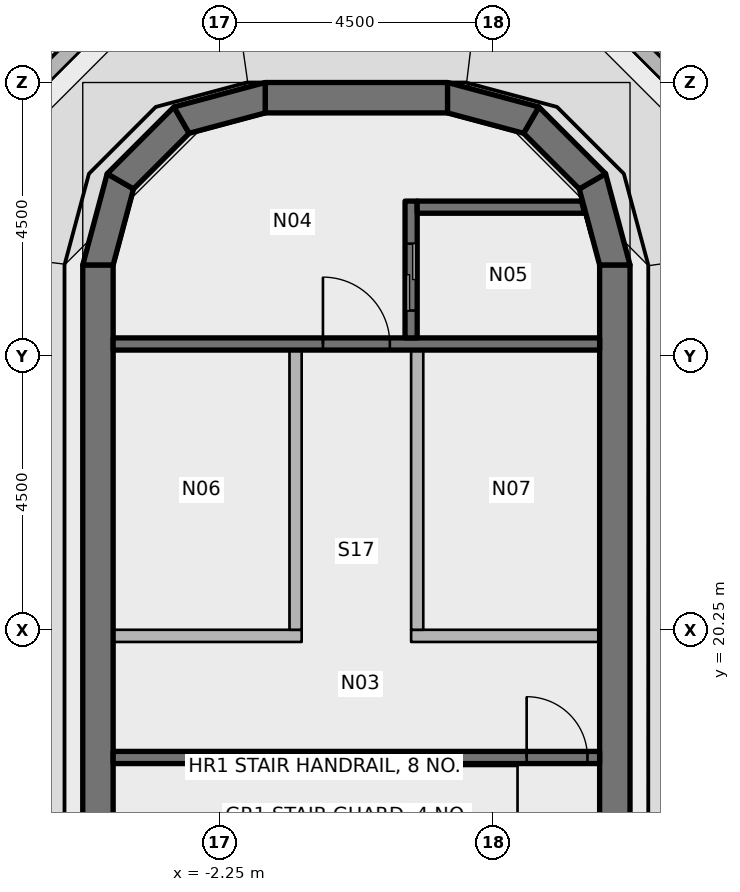
"""IFC4 building model, lengths in metres.
Left out: names, types, materials, properties, quantities, classifications, styles, units other than length and angle.
Written with IfcOpenShell. Run it as: python <this file> out.ifc"""

import sys

from ifc_helpers import new_model, si_unit, direction, frame, frame_2d, origin, place, context, subcontext, project, spatial, polyline, rectangle, outline, extrude, element, fill, save


model = new_model("IFC4")
c1 = context("Model", 3, precision=1e-05, world=origin(), true_north=direction((0.0, 1.0)))
c2 = subcontext(c1, "Body", "Model", "MODEL_VIEW")
j1 = project(units=[si_unit("LENGTHUNIT", "METRE"), si_unit("PLANEANGLEUNIT", "RADIAN")], contexts=[c1])
p1 = place(None, origin())
s1 = spatial("IfcSite", under=j1, at=p1, CompositionType="ELEMENT")
p2 = place(p1, origin())
s2 = spatial("IfcBuilding", under=s1, at=p2, CompositionType="ELEMENT")
p3 = place(p2, frame((0.0, 0.0, 316.8)))
s3 = spatial("IfcBuildingStorey", under=s2, at=p3, CompositionType="ELEMENT", Elevation=316.8)
for number, where, z_axis, x_axis in (
    (1, (-4.25, 11.25, 0.0), (0.0, 0.0, 1.0), (0.0, 1.0, 0.0)),
    (2, (4.25, 11.25, 0.0), (0.0, 0.0, 1.0), (0.0, 1.0, 0.0)),
):
    element("IfcWall", number, at=place(p3, frame(where, z_axis=z_axis, x_axis=x_axis)), inside=s3, PredefinedType="SHEAR", context=c2, shape_type="SweptSolid", body=[
        extrude(rectangle(XDim=15.0, YDim=0.5, at=frame_2d((7.5, 0.0))), origin(), (0.0, 0.0, 1.0), 3.35),
    ])
p4 = place(p3, frame((-1.5, 29.0, 0.0), z_axis=(0.0, 0.0, 1.0), x_axis=(1.0, 0.0, 0.0)))
e3 = element("IfcWall", 3, at=p4, inside=s3, PredefinedType="SHEAR", context=c2, shape_type="SweptSolid", body=[
    extrude(rectangle(XDim=3.0, YDim=0.5, at=frame_2d((1.5, 0.0))), origin(), (0.0, 0.0, 1.0), 3.35),
])
p5 = place(p3, origin())
e4 = element("IfcWall", 4, at=p5, inside=s3, PredefinedType="SHEAR", context=c2, shape_type="SweptSolid", body=[
    extrude(outline(polyline([(-4.5, 26.25), (-4.098, 27.75), (-3.665, 27.5), (-4.0, 26.25), (-4.5, 26.25)])), origin(), (0.0, 0.0, 1.0), 3.35),
])
p6 = place(p3, origin())
e5 = element("IfcWall", 5, at=p6, inside=s3, PredefinedType="SHEAR", context=c2, shape_type="SweptSolid", body=[
    extrude(outline(polyline([(-4.098, 27.75), (-3.0, 28.848), (-2.75, 28.415), (-3.665, 27.5), (-4.098, 27.75)])), origin(), (0.0, 0.0, 1.0), 3.35),
])
p7 = place(p3, origin())
e6 = element("IfcWall", 6, at=p7, inside=s3, PredefinedType="SHEAR", context=c2, shape_type="SweptSolid", body=[
    extrude(outline(polyline([(-3.0, 28.848), (-1.5, 29.25), (-1.5, 28.75), (-2.75, 28.415), (-3.0, 28.848)])), origin(), (0.0, 0.0, 1.0), 3.35),
])
p8 = place(p3, origin())
e7 = element("IfcWall", 7, at=p8, inside=s3, PredefinedType="SHEAR", context=c2, shape_type="SweptSolid", body=[
    extrude(outline(polyline([(4.5, 26.25), (4.098, 27.75), (3.665, 27.5), (4.0, 26.25), (4.5, 26.25)])), origin(), (0.0, 0.0, 1.0), 3.35),
])
p9 = place(p3, origin())
e8 = element("IfcWall", 8, at=p9, inside=s3, PredefinedType="SHEAR", context=c2, shape_type="SweptSolid", body=[
    extrude(outline(polyline([(4.098, 27.75), (3.0, 28.848), (2.75, 28.415), (3.665, 27.5), (4.098, 27.75)])), origin(), (0.0, 0.0, 1.0), 3.35),
])
p10 = place(p3, origin())
e9 = element("IfcWall", 9, at=p10, inside=s3, PredefinedType="SHEAR", context=c2, shape_type="SweptSolid", body=[
    extrude(outline(polyline([(3.0, 28.848), (1.5, 29.25), (1.5, 28.75), (2.75, 28.415), (3.0, 28.848)])), origin(), (0.0, 0.0, 1.0), 3.35),
])
p11 = place(p3, origin())
e10 = element("IfcWall", 10, at=p11, inside=s3, PredefinedType="PARAPET", context=c2, shape_type="SweptSolid", body=[
    extrude(outline(polyline([(-5.994, 28.671), (-4.221, 30.444), (-4.092, 30.22), (-5.77, 28.542), (-5.994, 28.671)])), origin(), (0.0, 0.0, 1.0), 1.22),
])
p12 = place(p3, origin())
e11 = element("IfcWall", 11, at=p12, inside=s3, PredefinedType="PARAPET", context=c2, shape_type="SweptSolid", body=[
    extrude(outline(polyline([(4.221, 30.444), (5.994, 28.671), (5.77, 28.542), (4.092, 30.22), (4.221, 30.444)])), origin(), (0.0, 0.0, 1.0), 1.22),
])
p13 = place(p3, frame((0.0, 0.0, 3.6)))
e12 = element("IfcWall", 12, at=p13, inside=s3, PredefinedType="PARAPET", context=c2, shape_type="SweptSolid", body=[
    extrude(outline(polyline([(-5.994, 28.671), (-4.221, 30.444), (-4.092, 30.22), (-5.77, 28.542), (-5.994, 28.671)])), origin(), (0.0, 0.0, 1.0), 1.22),
])
p14 = place(p3, frame((0.0, 0.0, 3.6)))
e13 = element("IfcWall", 13, at=p14, inside=s3, PredefinedType="PARAPET", context=c2, shape_type="SweptSolid", body=[
    extrude(outline(polyline([(4.221, 30.444), (5.994, 28.671), (5.77, 28.542), (4.092, 30.22), (4.221, 30.444)])), origin(), (0.0, 0.0, 1.0), 1.22),
])
p15 = place(p3, frame((-4.0, 24.95, 0.0), z_axis=(0.0, 0.0, 1.0), x_axis=(1.0, 0.0, 0.0)))
e14 = element("IfcWall", 14, at=p15, inside=s3, PredefinedType="SHEAR", context=c2, shape_type="SweptSolid", body=[
    extrude(rectangle(XDim=8.0, YDim=0.2, at=frame_2d((4.0, 0.0))), origin(), (0.0, 0.0, 1.0), 3.35),
])
p16 = place(p15, frame((3.45, 0.0, 0.0)))
e15 = element("IfcOpeningElement", 15, at=p16, cuts=e14, PredefinedType="OPENING", context=c2, shape_type="SweptSolid", body=[
    extrude(rectangle(XDim=1.1, YDim=2.1, at=frame_2d((0.55, 1.05))), frame((0.0, 0.11, 0.0), z_axis=(0.0, -1.0, 0.0), x_axis=(1.0, 0.0, 0.0)), (0.0, 0.0, 1.0), 0.22),
])
p17 = place(p3, frame((0.9, 27.3, 0.0), z_axis=(0.0, 0.0, 1.0), x_axis=(0.0, -1.0, 0.0)))
e16 = element("IfcWall", 16, at=p17, inside=s3, PredefinedType="SHEAR", context=c2, shape_type="SweptSolid", body=[
    extrude(rectangle(XDim=2.25, YDim=0.2, at=frame_2d((1.125, 0.0))), origin(), (0.0, 0.0, 1.0), 3.35),
])
p18 = place(p17, frame((0.7, 0.0, 0.0)))
e17 = element("IfcOpeningElement", 17, at=p18, cuts=e16, PredefinedType="OPENING", context=c2, shape_type="SweptSolid", body=[
    extrude(rectangle(XDim=1.1, YDim=2.3, at=frame_2d((0.55, 1.15))), frame((0.0, 0.11, 0.0), z_axis=(0.0, -1.0, 0.0), x_axis=(1.0, 0.0, 0.0)), (0.0, 0.0, 1.0), 0.22),
])
p19 = place(p3, origin())
e18 = element("IfcWall", 18, at=p19, inside=s3, PredefinedType="SHEAR", context=c2, shape_type="SweptSolid", body=[
    extrude(outline(polyline([(1.0, 27.1), (3.755, 27.1), (3.701, 27.3), (1.0, 27.3), (1.0, 27.1)])), origin(), (0.0, 0.0, 1.0), 3.35),
])
p20 = place(p3, frame((-4.0, 18.15, 0.0), z_axis=(0.0, 0.0, 1.0), x_axis=(1.0, 0.0, 0.0)))
e19 = element("IfcWall", 19, at=p20, inside=s3, PredefinedType="SHEAR", context=c2, shape_type="SweptSolid", body=[
    extrude(rectangle(XDim=8.0, YDim=0.2, at=frame_2d((4.0, 0.0))), origin(), (0.0, 0.0, 1.0), 3.35),
])
p21 = place(p20, frame((6.8, 0.0, 0.0)))
e20 = element("IfcOpeningElement", 20, at=p21, cuts=e19, PredefinedType="OPENING", context=c2, shape_type="SweptSolid", body=[
    extrude(rectangle(XDim=1.0, YDim=2.1, at=frame_2d((0.5, 1.05))), frame((0.0, 0.11, 0.0), z_axis=(0.0, -1.0, 0.0), x_axis=(1.0, 0.0, 0.0)), (0.0, 0.0, 1.0), 0.22),
])
p22 = place(p3, frame((-4.0, 20.15, 0.0), z_axis=(0.0, 0.0, 1.0), x_axis=(1.0, 0.0, 0.0)))
e21 = element("IfcWall", 21, at=p22, inside=s3, PredefinedType="PARTITIONING", context=c2, shape_type="SweptSolid", body=[
    extrude(rectangle(XDim=3.1, YDim=0.2, at=frame_2d((1.55, 0.0))), origin(), (0.0, 0.0, 1.0), 3.35),
])
p23 = place(p3, frame((-1.0, 24.85, 0.0), z_axis=(0.0, 0.0, 1.0), x_axis=(0.0, -1.0, 0.0)))
e22 = element("IfcWall", 22, at=p23, inside=s3, PredefinedType="PARTITIONING", context=c2, shape_type="SweptSolid", body=[
    extrude(rectangle(XDim=4.6, YDim=0.2, at=frame_2d((2.3, 0.0))), origin(), (0.0, 0.0, 1.0), 3.35),
])
p24 = place(p3, frame((0.9, 20.15, 0.0), z_axis=(0.0, 0.0, 1.0), x_axis=(1.0, 0.0, 0.0)))
e23 = element("IfcWall", 23, at=p24, inside=s3, PredefinedType="PARTITIONING", context=c2, shape_type="SweptSolid", body=[
    extrude(rectangle(XDim=3.1, YDim=0.2, at=frame_2d((1.55, 0.0))), origin(), (0.0, 0.0, 1.0), 3.35),
])
p25 = place(p3, frame((1.0, 24.85, 0.0), z_axis=(0.0, 0.0, 1.0), x_axis=(0.0, -1.0, 0.0)))
e24 = element("IfcWall", 24, at=p25, inside=s3, PredefinedType="PARTITIONING", context=c2, shape_type="SweptSolid", body=[
    extrude(rectangle(XDim=4.6, YDim=0.2, at=frame_2d((2.3, 0.0))), origin(), (0.0, 0.0, 1.0), 3.35),
])
p26 = place(p16, origin())
e25 = element("IfcDoor", 25, at=p26, inside=s3, OperationType="SINGLE_SWING_LEFT", PredefinedType="DOOR", context=c2, shape_type="SweptSolid", body=[
    extrude(rectangle(XDim=1.1, YDim=2.1, at=frame_2d((0.55, 1.05))), frame((0.0, 0.025, 0.0), z_axis=(0.0, -1.0, 0.0), x_axis=(1.0, 0.0, 0.0)), (0.0, 0.0, 1.0), 0.05),
])
fill(e15, e25)
p27 = place(p21, origin())
e26 = element("IfcDoor", 26, at=p27, inside=s3, OperationType="SINGLE_SWING_LEFT", PredefinedType="DOOR", context=c2, shape_type="SweptSolid", body=[
    extrude(rectangle(XDim=1.0, YDim=2.1, at=frame_2d((0.5, 1.05))), frame((0.0, 0.025, 0.0), z_axis=(0.0, -1.0, 0.0), x_axis=(1.0, 0.0, 0.0)), (0.0, 0.0, 1.0), 0.05),
])
fill(e20, e26)
p28 = place(p18, origin())
e27 = element("IfcDoor", 27, at=p28, inside=s3, OperationType="DOUBLE_DOOR_SLIDING", PredefinedType="DOOR", context=c2, shape_type="SweptSolid", body=[
    extrude(rectangle(XDim=1.1, YDim=2.3, at=frame_2d((0.55, 1.15))), frame((0.0, 0.025, 0.0), z_axis=(0.0, -1.0, 0.0), x_axis=(1.0, 0.0, 0.0)), (0.0, 0.0, 1.0), 0.05),
])
fill(e17, e27)
save(model, sys.argv[1])
